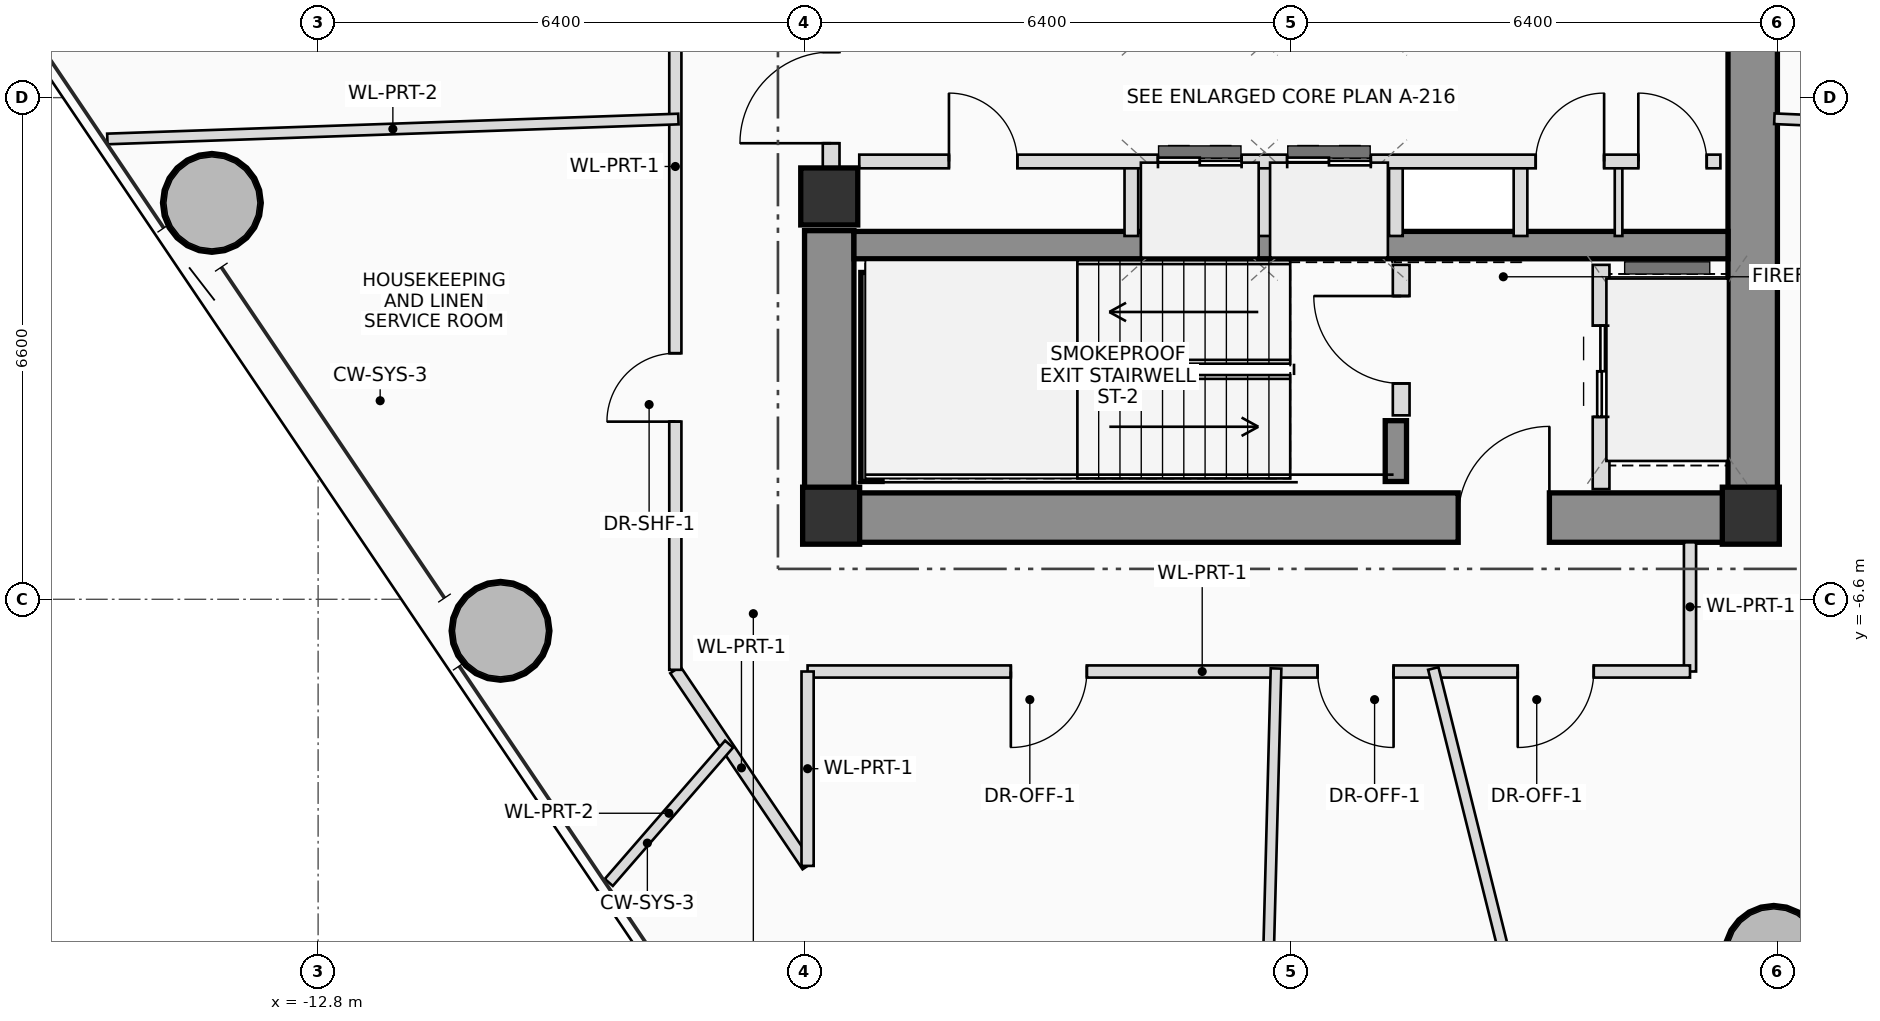
"""IFC4 building model, lengths in metres.
Left out: names, types, materials, properties, quantities, classifications, styles, units other than length and angle.
Written with IfcOpenShell. Run it as: python <this file> out.ifc"""

import sys

from ifc_helpers import new_model, si_unit, direction, frame, frame_2d, origin, origin_2d, place, context, subcontext, project, spatial, rectangle, hollow_circle, extrude, source, transform, mapped, element, fill, save


model = new_model("IFC4")
c1 = context("Model", 3, precision=1e-05, world=origin(), true_north=direction((0.0, 1.0)))
c2 = subcontext(c1, "Body", "Model", "MODEL_VIEW")
j1 = project(units=[si_unit("LENGTHUNIT", "METRE"), si_unit("PLANEANGLEUNIT", "RADIAN")], contexts=[c1])
p1 = place(None, origin())
s1 = spatial("IfcSite", under=j1, at=p1, CompositionType="ELEMENT")
p2 = place(p1, origin())
s2 = spatial("IfcBuilding", under=s1, at=p2, CompositionType="ELEMENT")
p3 = place(p2, frame((0.0, 0.0, 169.1)))
s3 = spatial("IfcBuildingStorey", under=s2, at=p3, CompositionType="ELEMENT", Elevation=169.1)
m1 = source(origin(), c2, "Body", "SweptSolid", [
    extrude(rectangle(XDim=0.75, YDim=0.75, at=origin_2d()), origin(), (0.0, 0.0, 1.0), 3.45),
])
for number, where, z_axis, x_axis in (
    (1, (-6.05, -5.5, 0.0), (0.0, 0.0, 1.0), (1.0, 0.0, 0.0)),
    (2, (6.05, -5.5, 0.0), (0.0, 0.0, 1.0), (1.0, 0.0, 0.0)),
):
    element("IfcColumn", number, at=place(p3, frame(where, z_axis=z_axis, x_axis=x_axis)), inside=s3, PredefinedType="COLUMN", context=c2, shape_type="MappedRepresentation", body=[
        mapped(m1, transform((0.0, 0.0, 0.0), scale=1.0)),
    ])
p4 = place(p3, frame((-6.4, -5.525, 0.0), z_axis=(0.0, 0.0, 1.0), x_axis=(1.0, 0.0, 0.0)))
e3 = element("IfcWall", 3, at=p4, inside=s3, PredefinedType="SHEAR", context=c2, shape_type="SweptSolid", body=[
    extrude(rectangle(XDim=12.8, YDim=0.65, at=frame_2d((6.4, 0.0))), origin(), (0.0, 0.0, 1.0), 3.45),
])
p5 = place(p4, frame((8.6, 0.0, 0.0)))
e4 = element("IfcOpeningElement", 4, at=p5, cuts=e3, PredefinedType="OPENING", context=c2, shape_type="SweptSolid", body=[
    extrude(rectangle(XDim=1.2, YDim=2.2, at=frame_2d((0.6, 1.1))), frame((0.0, 0.335, 0.0), z_axis=(0.0, -1.0, 0.0), x_axis=(1.0, 0.0, 0.0)), (0.0, 0.0, 1.0), 0.67),
])
p6 = place(p3, frame((6.075, -5.2, 0.0), z_axis=(0.0, 0.0, 1.0), x_axis=(0.0, 1.0, 0.0)))
e5 = element("IfcWall", 5, at=p6, inside=s3, PredefinedType="SHEAR", context=c2, shape_type="SweptSolid", body=[
    extrude(rectangle(XDim=10.4, YDim=0.65, at=frame_2d((5.2, 0.0))), origin(), (0.0, 0.0, 1.0), 3.45),
])
p7 = place(p3, frame((-6.075, -5.2, 0.0), z_axis=(0.0, 0.0, 1.0), x_axis=(0.0, 1.0, 0.0)))
e6 = element("IfcWall", 6, at=p7, inside=s3, PredefinedType="SHEAR", context=c2, shape_type="SweptSolid", body=[
    extrude(rectangle(XDim=3.45, YDim=0.65, at=frame_2d((1.725, 0.0))), origin(), (0.0, 0.0, 1.0), 3.45),
])
p8 = place(p3, frame((-5.75, -1.94, 0.0), z_axis=(0.0, 0.0, 1.0), x_axis=(1.0, 0.0, 0.0)))
e7 = element("IfcWall", 7, at=p8, inside=s3, PredefinedType="SHEAR", context=c2, shape_type="SweptSolid", body=[
    extrude(rectangle(XDim=11.5, YDim=0.36, at=frame_2d((5.75, 0.0))), origin(), (0.0, 0.0, 1.0), 3.45),
])
p9 = place(p3, frame((-5.52, -5.05, 0.0), z_axis=(0.0, 0.0, 1.0), x_axis=(0.0, 1.0, 0.0)))
e8 = element("IfcWall", 8, at=p9, inside=s3, PredefinedType="SHEAR", context=c2, shape_type="SweptSolid", body=[
    extrude(rectangle(XDim=2.75, YDim=0.28, at=frame_2d((1.375, 0.0))), origin(), (0.0, 0.0, 1.0), 3.45),
])
p10 = place(p3, frame((1.38, -5.05, 0.0), z_axis=(0.0, 0.0, 1.0), x_axis=(0.0, 1.0, 0.0)))
e9 = element("IfcWall", 9, at=p10, inside=s3, PredefinedType="SHEAR", context=c2, shape_type="SweptSolid", body=[
    extrude(rectangle(XDim=0.8, YDim=0.28, at=frame_2d((0.4, 0.0))), origin(), (0.0, 0.0, 1.0), 3.45),
])
p11 = place(p3, frame((-6.075, -1.3, 0.0), z_axis=(0.0, 0.0, 1.0), x_axis=(1.0, 0.0, 0.0)))
e10 = element("IfcColumn", 10, at=p11, inside=s3, PredefinedType="COLUMN", context=c2, shape_type="MappedRepresentation", body=[
    mapped(m1, transform((0.0, 0.0, 0.0), scale=1.0)),
])
m2 = source(origin(), c2, "Body", "SweptSolid", [
    extrude(hollow_circle(Radius=0.65, WallThickness=0.045, at=origin_2d()), origin(), (0.0, 0.0, 1.0), 3.45),
])
for number, where, z_axis, x_axis in (
    (11, (6.352, -11.278, 0.0), (0.0, 0.0, 1.0), (1.0, 0.0, 0.0)),
    (12, (-14.198, -1.385, 0.0), (0.0, 0.0, 1.0), (1.0, 0.0, 0.0)),
    (13, (-10.4, -7.015, 0.0), (0.0, 0.0, 1.0), (1.0, 0.0, 0.0)),
):
    element("IfcColumn", number, at=place(p3, frame(where, z_axis=z_axis, x_axis=x_axis)), inside=s3, PredefinedType="COLUMN", context=c2, shape_type="MappedRepresentation", body=[
        mapped(m2, transform((0.0, 0.0, 0.0), scale=1.0)),
    ])
p12 = place(p3, frame((-6.05, -0.95, 0.0), z_axis=(0.0, 0.0, 1.0), x_axis=(0.0, 1.0, 0.0)))
e14 = element("IfcWall", 14, at=p12, inside=s3, PredefinedType="PLUMBINGWALL", context=c2, shape_type="SweptSolid", body=[
    extrude(rectangle(XDim=1.9, YDim=0.22, at=frame_2d((0.95, 0.0))), origin(), (0.0, 0.0, 1.0), 2.23),
])
p13 = place(p12, frame((0.35, 0.0, 0.0)))
e15 = element("IfcOpeningElement", 15, at=p13, cuts=e14, PredefinedType="OPENING", context=c2, shape_type="SweptSolid", body=[
    extrude(rectangle(XDim=1.2, YDim=2.2, at=frame_2d((0.6, 1.1))), frame((0.0, 0.12, 0.0), z_axis=(0.0, -1.0, 0.0), x_axis=(1.0, 0.0, 0.0)), (0.0, 0.0, 1.0), 0.24),
])
p14 = place(p3, frame((1.45, -4.18, 0.0), z_axis=(0.0, 0.0, 1.0), x_axis=(0.0, 1.0, 0.0)))
e16 = element("IfcWall", 16, at=p14, inside=s3, PredefinedType="PLUMBINGWALL", context=c2, shape_type="SweptSolid", body=[
    extrude(rectangle(XDim=1.98, YDim=0.22, at=frame_2d((0.99, 0.0))), origin(), (0.0, 0.0, 1.0), 3.25),
])
p15 = place(p14, frame((0.42, 0.0, 0.0)))
e17 = element("IfcOpeningElement", 17, at=p15, cuts=e16, PredefinedType="OPENING", context=c2, shape_type="SweptSolid", body=[
    extrude(rectangle(XDim=1.15, YDim=2.15, at=frame_2d((0.575, 1.075))), frame((0.0, 0.12, 0.0), z_axis=(0.0, -1.0, 0.0), x_axis=(1.0, 0.0, 0.0)), (0.0, 0.0, 1.0), 0.24),
])
p16 = place(p3, frame((4.08, -5.15, 0.0), z_axis=(0.0, 0.0, 1.0), x_axis=(0.0, 1.0, 0.0)))
e18 = element("IfcWall", 18, at=p16, inside=s3, PredefinedType="PLUMBINGWALL", context=c2, shape_type="SweptSolid", body=[
    extrude(rectangle(XDim=2.95, YDim=0.22, at=frame_2d((1.475, 0.0))), origin(), (0.0, 0.0, 1.0), 3.25),
])
p17 = place(p16, frame((0.95, 0.0, 0.0)))
e19 = element("IfcOpeningElement", 19, at=p17, cuts=e18, PredefinedType="OPENING", context=c2, shape_type="SweptSolid", body=[
    extrude(rectangle(XDim=1.2, YDim=2.25, at=frame_2d((0.6, 1.125))), frame((0.0, 0.12, 0.0), z_axis=(0.0, -1.0, 0.0), x_axis=(1.0, 0.0, 0.0)), (0.0, 0.0, 1.0), 0.24),
])
for number, where, z_axis, x_axis in (
    (20, (-2.1, -1.82, 0.0), (0.0, 0.0, 1.0), (0.0, 1.0, 0.0)),
    (21, (-0.35, -1.82, 0.0), (0.0, 0.0, 1.0), (0.0, 1.0, 0.0)),
    (22, (1.38, -1.82, 0.0), (0.0, 0.0, 1.0), (0.0, 1.0, 0.0)),
    (23, (3.02, -1.82, 0.0), (0.0, 0.0, 1.0), (0.0, 1.0, 0.0)),
):
    element("IfcWall", number, at=place(p3, frame(where, z_axis=z_axis, x_axis=x_axis)), inside=s3, PredefinedType="PLUMBINGWALL", context=c2, shape_type="SweptSolid", body=[
        extrude(rectangle(XDim=0.98, YDim=0.18, at=frame_2d((0.49, 0.0))), origin(), (0.0, 0.0, 1.0), 3.25),
    ])
p18 = place(p3, frame((4.31, -1.82, 0.0), z_axis=(0.0, 0.0, 1.0), x_axis=(0.0, 1.0, 0.0)))
e24 = element("IfcWall", 24, at=p18, inside=s3, PredefinedType="PARTITIONING", context=c2, shape_type="SweptSolid", body=[
    extrude(rectangle(XDim=0.98, YDim=0.1, at=frame_2d((0.49, 0.0))), origin(), (0.0, 0.0, 1.0), 3.25),
])
p19 = place(p3, frame((-5.68, -0.84, 0.0), z_axis=(0.0, 0.0, 1.0), x_axis=(1.0, 0.0, 0.0)))
e25 = element("IfcWall", 25, at=p19, inside=s3, PredefinedType="PLUMBINGWALL", context=c2, shape_type="SweptSolid", body=[
    extrude(rectangle(XDim=11.33, YDim=0.18, at=frame_2d((5.665, 0.0))), origin(), (0.0, 0.0, 1.0), 3.25),
])
p20 = place(p19, frame((1.18, 0.0, 0.0)))
e26 = element("IfcOpeningElement", 26, at=p20, cuts=e25, PredefinedType="OPENING", context=c2, shape_type="SweptSolid", body=[
    extrude(rectangle(XDim=0.9, YDim=2.05, at=frame_2d((0.45, 1.025))), frame((0.0, 0.1, 0.0), z_axis=(0.0, -1.0, 0.0), x_axis=(1.0, 0.0, 0.0)), (0.0, 0.0, 1.0), 0.2),
])
p21 = place(p19, frame((3.93, 0.0, 0.0)))
e27 = element("IfcOpeningElement", 27, at=p21, cuts=e25, PredefinedType="OPENING", context=c2, shape_type="SweptSolid", body=[
    extrude(rectangle(XDim=1.1, YDim=2.2, at=frame_2d((0.55, 1.1))), frame((0.0, 0.1, 0.0), z_axis=(0.0, -1.0, 0.0), x_axis=(1.0, 0.0, 0.0)), (0.0, 0.0, 1.0), 0.2),
])
p22 = place(p19, frame((5.63, 0.0, 0.0)))
e28 = element("IfcOpeningElement", 28, at=p22, cuts=e25, PredefinedType="OPENING", context=c2, shape_type="SweptSolid", body=[
    extrude(rectangle(XDim=1.1, YDim=2.2, at=frame_2d((0.55, 1.1))), frame((0.0, 0.1, 0.0), z_axis=(0.0, -1.0, 0.0), x_axis=(1.0, 0.0, 0.0)), (0.0, 0.0, 1.0), 0.2),
])
p23 = place(p19, frame((8.9, 0.0, 0.0)))
e29 = element("IfcOpeningElement", 29, at=p23, cuts=e25, PredefinedType="OPENING", context=c2, shape_type="SweptSolid", body=[
    extrude(rectangle(XDim=0.9, YDim=2.05, at=frame_2d((0.45, 1.025))), frame((0.0, 0.1, 0.0), z_axis=(0.0, -1.0, 0.0), x_axis=(1.0, 0.0, 0.0)), (0.0, 0.0, 1.0), 0.2),
])
p24 = place(p19, frame((10.25, 0.0, 0.0)))
e30 = element("IfcOpeningElement", 30, at=p24, cuts=e25, PredefinedType="OPENING", context=c2, shape_type="SweptSolid", body=[
    extrude(rectangle(XDim=0.9, YDim=2.05, at=frame_2d((0.45, 1.025))), frame((0.0, 0.1, 0.0), z_axis=(0.0, -1.0, 0.0), x_axis=(1.0, 0.0, 0.0)), (0.0, 0.0, 1.0), 0.2),
])
p25 = place(p3, frame((-6.36, -10.107, 0.0), z_axis=(0.0, 0.0, 1.0), x_axis=(-0.559200615657, 0.829032370567, 0.0)))
e31 = element("IfcWall", 31, at=p25, inside=s3, PredefinedType="PARTITIONING", context=c2, shape_type="SweptSolid", body=[
    extrude(rectangle(XDim=3.112, YDim=0.16, at=frame_2d((1.556, 0.0))), origin(), (0.0, 0.0, 1.0), 2.605),
])
p26 = place(p3, frame((-8.1, -7.528, 0.0), z_axis=(0.0, 0.0, 1.0), x_axis=(0.0, 1.0, 0.0)))
e32 = element("IfcWall", 32, at=p26, inside=s3, PredefinedType="PARTITIONING", context=c2, shape_type="SweptSolid", body=[
    extrude(rectangle(XDim=15.078, YDim=0.16, at=frame_2d((7.539, 0.0))), origin(), (0.0, 0.0, 1.0), 2.605),
])
p27 = place(p26, frame((3.265, 0.0, 0.0)))
e33 = element("IfcOpeningElement", 33, at=p27, cuts=e32, PredefinedType="OPENING", context=c2, shape_type="SweptSolid", body=[
    extrude(rectangle(XDim=0.9, YDim=2.05, at=frame_2d((0.45, 1.025))), frame((0.0, 0.09, 0.0), z_axis=(0.0, -1.0, 0.0), x_axis=(1.0, 0.0, 0.0)), (0.0, 0.0, 1.0), 0.18),
])
p28 = place(p26, frame((9.079, 0.0, 0.0)))
e34 = element("IfcOpeningElement", 34, at=p28, cuts=e32, PredefinedType="OPENING", context=c2, shape_type="SweptSolid", body=[
    extrude(rectangle(XDim=1.05, YDim=2.2, at=frame_2d((0.525, 1.1))), frame((0.0, 0.09, 0.0), z_axis=(0.0, -1.0, 0.0), x_axis=(1.0, 0.0, 0.0)), (0.0, 0.0, 1.0), 0.18),
])
p29 = place(p26, frame((12.91, 0.0, 0.0)))
e35 = element("IfcOpeningElement", 35, at=p29, cuts=e32, PredefinedType="OPENING", context=c2, shape_type="SweptSolid", body=[
    extrude(rectangle(XDim=1.05, YDim=2.2, at=frame_2d((0.525, 1.1))), frame((0.0, 0.09, 0.0), z_axis=(0.0, -1.0, 0.0), x_axis=(1.0, 0.0, 0.0)), (0.0, 0.0, 1.0), 0.18),
])
p30 = place(p3, frame((5.25, -5.85, 0.0), z_axis=(0.0, 0.0, 1.0), x_axis=(0.0, -1.0, 0.0)))
e36 = element("IfcWall", 36, at=p30, inside=s3, PredefinedType="PARTITIONING", context=c2, shape_type="SweptSolid", body=[
    extrude(rectangle(XDim=1.7, YDim=0.16, at=frame_2d((0.85, 0.0))), origin(), (0.0, 0.0, 1.0), 3.25),
])
p31 = place(p3, frame((5.25, -7.55, 0.0), z_axis=(0.0, 0.0, 1.0), x_axis=(-1.0, 0.0, 0.0)))
e37 = element("IfcWall", 37, at=p31, inside=s3, PredefinedType="PARTITIONING", context=c2, shape_type="SweptSolid", body=[
    extrude(rectangle(XDim=11.61, YDim=0.16, at=frame_2d((5.805, 0.0))), origin(), (0.0, 0.0, 1.0), 2.605),
])
p32 = place(p31, frame((1.267, 0.0, 0.0)))
e38 = element("IfcOpeningElement", 38, at=p32, cuts=e37, PredefinedType="OPENING", context=c2, shape_type="SweptSolid", body=[
    extrude(rectangle(XDim=1.0, YDim=2.25, at=frame_2d((0.5, 1.125))), frame((0.0, 0.09, 0.0), z_axis=(0.0, -1.0, 0.0), x_axis=(1.0, 0.0, 0.0)), (0.0, 0.0, 1.0), 0.18),
])
p33 = place(p31, frame((3.9, 0.0, 0.0)))
e39 = element("IfcOpeningElement", 39, at=p33, cuts=e37, PredefinedType="OPENING", context=c2, shape_type="SweptSolid", body=[
    extrude(rectangle(XDim=1.0, YDim=2.25, at=frame_2d((0.5, 1.125))), frame((0.0, 0.09, 0.0), z_axis=(0.0, -1.0, 0.0), x_axis=(1.0, 0.0, 0.0)), (0.0, 0.0, 1.0), 0.18),
])
p34 = place(p31, frame((7.936, 0.0, 0.0)))
e40 = element("IfcOpeningElement", 40, at=p34, cuts=e37, PredefinedType="OPENING", context=c2, shape_type="SweptSolid", body=[
    extrude(rectangle(XDim=1.0, YDim=2.25, at=frame_2d((0.5, 1.125))), frame((0.0, 0.09, 0.0), z_axis=(0.0, -1.0, 0.0), x_axis=(1.0, 0.0, 0.0)), (0.0, 0.0, 1.0), 0.18),
])
p35 = place(p3, frame((-6.36, -7.55, 0.0), z_axis=(0.0, 0.0, 1.0), x_axis=(0.0, -1.0, 0.0)))
e41 = element("IfcWall", 41, at=p35, inside=s3, PredefinedType="PARTITIONING", context=c2, shape_type="SweptSolid", body=[
    extrude(rectangle(XDim=2.557, YDim=0.16, at=frame_2d((1.279, 0.0))), origin(), (0.0, 0.0, 1.0), 2.605),
])
p36 = place(p3, frame((6.36, -0.278, 0.0), z_axis=(0.0, 0.0, 1.0), x_axis=(0.999047983793, -0.043624833281, 0.0)))
e42 = element("IfcWall", 42, at=p36, inside=s3, PredefinedType="PARTITIONING", context=c2, shape_type="SweptSolid", body=[
    extrude(rectangle(XDim=6.833, YDim=0.14, at=frame_2d((3.417, 0.0))), origin(), (0.0, 0.0, 1.0), 2.605),
])
p37 = place(p3, frame((-8.06, -0.281, 0.0), z_axis=(0.0, 0.0, 1.0), x_axis=(-0.999391525522, -0.034879488461, 0.0)))
e43 = element("IfcWall", 43, at=p37, inside=s3, PredefinedType="PARTITIONING", context=c2, shape_type="SweptSolid", body=[
    extrude(rectangle(XDim=7.518, YDim=0.14, at=frame_2d((3.759, 0.0))), origin(), (0.0, 0.0, 1.0), 2.765),
])
p38 = place(p3, frame((-7.393, -8.505, 0.0), z_axis=(0.0, 0.0, 1.0), x_axis=(-0.656043394523, -0.754723170774, 0.0)))
e44 = element("IfcWall", 44, at=p38, inside=s3, PredefinedType="PARTITIONING", context=c2, shape_type="SweptSolid", body=[
    extrude(rectangle(XDim=2.412, YDim=0.14, at=frame_2d((1.206, 0.0))), origin(), (0.0, 0.0, 1.0), 2.765),
])
p39 = place(p3, frame((-0.197, -7.51, 0.0), z_axis=(0.0, 0.0, 1.0), x_axis=(-0.026169420715, -0.999657522064, 0.0)))
e45 = element("IfcWall", 45, at=p39, inside=s3, PredefinedType="PARTITIONING", context=c2, shape_type="SweptSolid", body=[
    extrude(rectangle(XDim=13.611, YDim=0.14, at=frame_2d((6.806, 0.0))), origin(), (0.0, 0.0, 1.0), 2.765),
])
p40 = place(p3, frame((1.873, -7.51, 0.0), z_axis=(0.0, 0.0, 1.0), x_axis=(0.241919667538, -0.970296281791, 0.0)))
e46 = element("IfcWall", 46, at=p40, inside=s3, PredefinedType="PARTITIONING", context=c2, shape_type="SweptSolid", body=[
    extrude(rectangle(XDim=9.327, YDim=0.14, at=frame_2d((4.664, 0.0))), origin(), (0.0, 0.0, 1.0), 2.605),
])
p41 = place(p5, origin())
e47 = element("IfcDoor", 47, at=p41, inside=s3, OperationType="SINGLE_SWING_RIGHT", PredefinedType="DOOR", context=c2, shape_type="SweptSolid", body=[
    extrude(rectangle(XDim=1.2, YDim=2.2, at=frame_2d((0.6, 1.1))), frame((0.0, 0.025, 0.0), z_axis=(0.0, -1.0, 0.0), x_axis=(1.0, 0.0, 0.0)), (0.0, 0.0, 1.0), 0.05),
])
fill(e4, e47)
p42 = place(p13, origin())
e48 = element("IfcDoor", 48, at=p42, inside=s3, OperationType="SINGLE_SWING_LEFT", PredefinedType="DOOR", context=c2, shape_type="SweptSolid", body=[
    extrude(rectangle(XDim=1.2, YDim=2.2, at=frame_2d((0.6, 1.1))), frame((0.0, 0.025, 0.0), z_axis=(0.0, -1.0, 0.0), x_axis=(1.0, 0.0, 0.0)), (0.0, 0.0, 1.0), 0.05),
])
fill(e15, e48)
p43 = place(p15, origin())
e49 = element("IfcDoor", 49, at=p43, inside=s3, OperationType="SINGLE_SWING_RIGHT", PredefinedType="DOOR", context=c2, shape_type="SweptSolid", body=[
    extrude(rectangle(XDim=1.15, YDim=2.15, at=frame_2d((0.575, 1.075))), frame((0.0, 0.025, 0.0), z_axis=(0.0, -1.0, 0.0), x_axis=(1.0, 0.0, 0.0)), (0.0, 0.0, 1.0), 0.05),
])
fill(e17, e49)
p44 = place(p17, origin())
e50 = element("IfcDoor", 50, at=p44, inside=s3, OperationType="DOUBLE_DOOR_SLIDING", PredefinedType="DOOR", context=c2, shape_type="SweptSolid", body=[
    extrude(rectangle(XDim=1.2, YDim=2.25, at=frame_2d((0.6, 1.125))), frame((0.0, 0.025, 0.0), z_axis=(0.0, -1.0, 0.0), x_axis=(1.0, 0.0, 0.0)), (0.0, 0.0, 1.0), 0.05),
])
fill(e19, e50)
p45 = place(p20, origin())
e51 = element("IfcDoor", 51, at=p45, inside=s3, OperationType="SINGLE_SWING_LEFT", PredefinedType="DOOR", context=c2, shape_type="SweptSolid", body=[
    extrude(rectangle(XDim=0.9, YDim=2.05, at=frame_2d((0.45, 1.025))), frame((0.0, 0.025, 0.0), z_axis=(0.0, -1.0, 0.0), x_axis=(1.0, 0.0, 0.0)), (0.0, 0.0, 1.0), 0.05),
])
fill(e26, e51)
p46 = place(p21, origin())
e52 = element("IfcDoor", 52, at=p46, inside=s3, OperationType="DOUBLE_DOOR_SLIDING", PredefinedType="DOOR", context=c2, shape_type="SweptSolid", body=[
    extrude(rectangle(XDim=1.1, YDim=2.2, at=frame_2d((0.55, 1.1))), frame((0.0, 0.025, 0.0), z_axis=(0.0, -1.0, 0.0), x_axis=(1.0, 0.0, 0.0)), (0.0, 0.0, 1.0), 0.05),
])
fill(e27, e52)
p47 = place(p22, origin())
e53 = element("IfcDoor", 53, at=p47, inside=s3, OperationType="DOUBLE_DOOR_SLIDING", PredefinedType="DOOR", context=c2, shape_type="SweptSolid", body=[
    extrude(rectangle(XDim=1.1, YDim=2.2, at=frame_2d((0.55, 1.1))), frame((0.0, 0.025, 0.0), z_axis=(0.0, -1.0, 0.0), x_axis=(1.0, 0.0, 0.0)), (0.0, 0.0, 1.0), 0.05),
])
fill(e28, e53)
p48 = place(p23, origin())
e54 = element("IfcDoor", 54, at=p48, inside=s3, OperationType="SINGLE_SWING_RIGHT", PredefinedType="DOOR", context=c2, shape_type="SweptSolid", body=[
    extrude(rectangle(XDim=0.9, YDim=2.05, at=frame_2d((0.45, 1.025))), frame((0.0, 0.025, 0.0), z_axis=(0.0, -1.0, 0.0), x_axis=(1.0, 0.0, 0.0)), (0.0, 0.0, 1.0), 0.05),
])
fill(e29, e54)
p49 = place(p24, origin())
e55 = element("IfcDoor", 55, at=p49, inside=s3, OperationType="SINGLE_SWING_LEFT", PredefinedType="DOOR", context=c2, shape_type="SweptSolid", body=[
    extrude(rectangle(XDim=0.9, YDim=2.05, at=frame_2d((0.45, 1.025))), frame((0.0, 0.025, 0.0), z_axis=(0.0, -1.0, 0.0), x_axis=(1.0, 0.0, 0.0)), (0.0, 0.0, 1.0), 0.05),
])
fill(e30, e55)
p50 = place(p27, origin())
e56 = element("IfcDoor", 56, at=p50, inside=s3, OperationType="SINGLE_SWING_LEFT", PredefinedType="DOOR", context=c2, shape_type="SweptSolid", body=[
    extrude(rectangle(XDim=0.9, YDim=2.05, at=frame_2d((0.45, 1.025))), frame((0.0, 0.025, 0.0), z_axis=(0.0, -1.0, 0.0), x_axis=(1.0, 0.0, 0.0)), (0.0, 0.0, 1.0), 0.05),
])
fill(e33, e56)
p51 = place(p32, origin())
e57 = element("IfcDoor", 57, at=p51, inside=s3, OperationType="SINGLE_SWING_RIGHT", PredefinedType="DOOR", context=c2, shape_type="SweptSolid", body=[
    extrude(rectangle(XDim=1.0, YDim=2.25, at=frame_2d((0.5, 1.125))), frame((0.0, 0.025, 0.0), z_axis=(0.0, -1.0, 0.0), x_axis=(1.0, 0.0, 0.0)), (0.0, 0.0, 1.0), 0.05),
])
fill(e38, e57)
p52 = place(p33, origin())
e58 = element("IfcDoor", 58, at=p52, inside=s3, OperationType="SINGLE_SWING_LEFT", PredefinedType="DOOR", context=c2, shape_type="SweptSolid", body=[
    extrude(rectangle(XDim=1.0, YDim=2.25, at=frame_2d((0.5, 1.125))), frame((0.0, 0.025, 0.0), z_axis=(0.0, -1.0, 0.0), x_axis=(1.0, 0.0, 0.0)), (0.0, 0.0, 1.0), 0.05),
])
fill(e39, e58)
p53 = place(p34, origin())
e59 = element("IfcDoor", 59, at=p53, inside=s3, OperationType="SINGLE_SWING_RIGHT", PredefinedType="DOOR", context=c2, shape_type="SweptSolid", body=[
    extrude(rectangle(XDim=1.0, YDim=2.25, at=frame_2d((0.5, 1.125))), frame((0.0, 0.025, 0.0), z_axis=(0.0, -1.0, 0.0), x_axis=(1.0, 0.0, 0.0)), (0.0, 0.0, 1.0), 0.05),
])
fill(e40, e59)
save(model, sys.argv[1])
